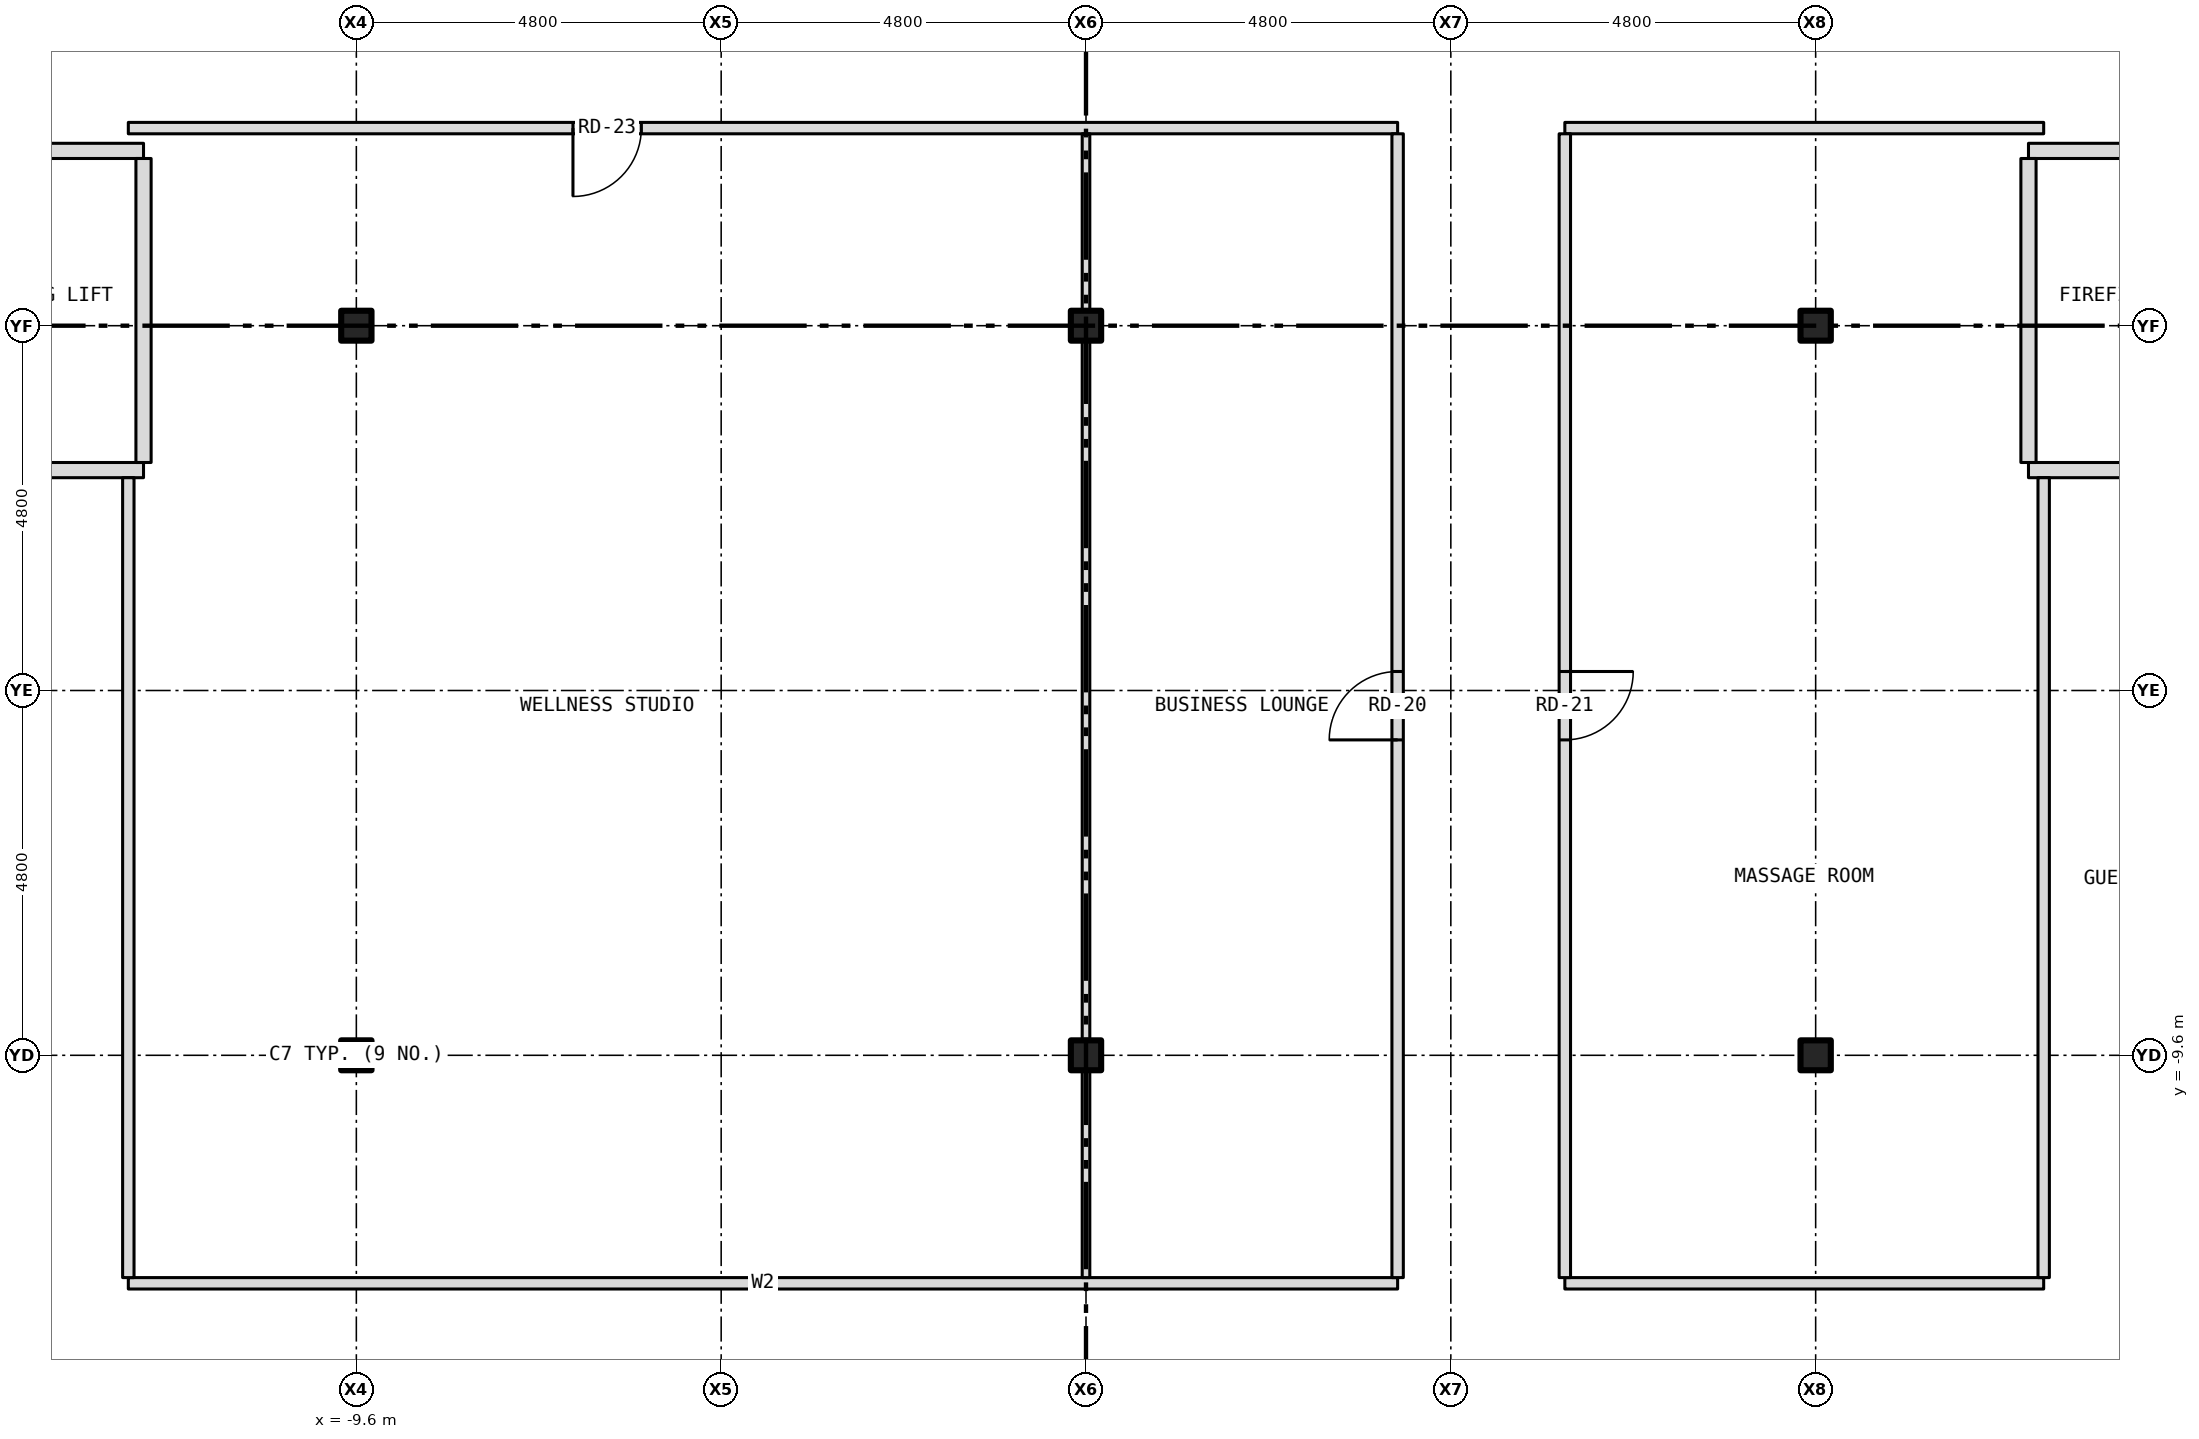
"""IFC4 building model, lengths in metres.
Left out: names, types, materials, properties, quantities, classifications, styles, units other than length and angle.
Written with IfcOpenShell. Run it as: python <this file> out.ifc"""

import sys

from ifc_helpers import new_model, si_unit, direction, frame, frame_2d, origin, origin_2d, place, context, subcontext, project, spatial, rectangle, i_section, extrude, element, fill, save


model = new_model("IFC4")
c1 = context("Model", 3, precision=1e-05, world=origin(), true_north=direction((0.0, 1.0)))
c2 = subcontext(c1, "Body", "Model", "MODEL_VIEW")
j1 = project(units=[si_unit("LENGTHUNIT", "METRE"), si_unit("PLANEANGLEUNIT", "RADIAN")], contexts=[c1])
p1 = place(None, origin())
s1 = spatial("IfcSite", under=j1, at=p1, CompositionType="ELEMENT")
p2 = place(p1, origin())
s2 = spatial("IfcBuilding", under=s1, at=p2, CompositionType="ELEMENT")
p3 = place(p2, frame((0.0, 0.0, 113.5)))
s3 = spatial("IfcBuildingStorey", under=s2, at=p3, CompositionType="ELEMENT", Elevation=113.5)
for number, where, z_axis, x_axis in (
    (1, (-9.6, -9.6, -0.15), (0.0, 0.0, 1.0), (1.0, 0.0, 0.0)),
    (2, (-9.6, 0.0, -0.15), (0.0, 0.0, 1.0), (1.0, 0.0, 0.0)),
    (3, (0.0, -9.6, -0.15), (0.0, 0.0, 1.0), (1.0, 0.0, 0.0)),
    (4, (0.0, 0.0, -0.15), (0.0, 0.0, 1.0), (1.0, 0.0, 0.0)),
    (5, (9.6, -9.6, -0.15), (0.0, 0.0, 1.0), (1.0, 0.0, 0.0)),
    (6, (9.6, 0.0, -0.15), (0.0, 0.0, 1.0), (1.0, 0.0, 0.0)),
):
    element("IfcColumn", number, at=place(p3, frame(where, z_axis=z_axis, x_axis=x_axis)), inside=s3, PredefinedType="COLUMN", context=c2, shape_type="SweptSolid", body=[
        extrude(i_section(OverallWidth=0.399, OverallDepth=0.394, WebThickness=0.023, FlangeThickness=0.037, at=origin_2d()), origin(), (0.0, 0.0, 1.0), 3.5),
    ])
p4 = place(p3, frame((-12.6, -12.6, 0.0), z_axis=(0.0, 0.0, 1.0), x_axis=(1.0, 0.0, 0.0)))
e7 = element("IfcWall", 7, at=p4, inside=s3, PredefinedType="PARTITIONING", context=c2, shape_type="SweptSolid", body=[
    extrude(rectangle(XDim=16.7, YDim=0.15, at=frame_2d((8.35, 0.0))), origin(), (0.0, 0.0, 1.0), 3.35),
])
p5 = place(p3, frame((6.3, -12.6, 0.0), z_axis=(0.0, 0.0, 1.0), x_axis=(1.0, 0.0, 0.0)))
e8 = element("IfcWall", 8, at=p5, inside=s3, PredefinedType="PARTITIONING", context=c2, shape_type="SweptSolid", body=[
    extrude(rectangle(XDim=6.3, YDim=0.15, at=frame_2d((3.15, 0.0))), origin(), (0.0, 0.0, 1.0), 3.35),
])
p6 = place(p3, frame((-15.68, -1.9, 0.0), z_axis=(0.0, 0.0, 1.0), x_axis=(1.0, 0.0, 0.0)))
e9 = element("IfcWall", 9, at=p6, inside=s3, PredefinedType="PARTITIONING", context=c2, shape_type="SweptSolid", body=[
    extrude(rectangle(XDim=3.28, YDim=0.2, at=frame_2d((1.64, 0.0))), origin(), (0.0, 0.0, 1.0), 3.35),
])
p7 = place(p6, frame((0.94, 0.0, 0.0)))
e10 = element("IfcOpeningElement", 10, at=p7, cuts=e9, PredefinedType="OPENING", context=c2, shape_type="SweptSolid", body=[
    extrude(rectangle(XDim=1.1, YDim=2.1, at=frame_2d((0.55, 1.05))), frame((0.0, 0.112, 0.0), z_axis=(0.0, -1.0, 0.0), x_axis=(1.0, 0.0, 0.0)), (0.0, 0.0, 1.0), 0.224),
])
p8 = place(p3, frame((12.4, -1.9, 0.0), z_axis=(0.0, 0.0, 1.0), x_axis=(1.0, 0.0, 0.0)))
e11 = element("IfcWall", 11, at=p8, inside=s3, PredefinedType="PARTITIONING", context=c2, shape_type="SweptSolid", body=[
    extrude(rectangle(XDim=3.28, YDim=0.2, at=frame_2d((1.64, 0.0))), origin(), (0.0, 0.0, 1.0), 3.35),
])
p9 = place(p8, frame((1.24, 0.0, 0.0)))
e12 = element("IfcOpeningElement", 12, at=p9, cuts=e11, PredefinedType="OPENING", context=c2, shape_type="SweptSolid", body=[
    extrude(rectangle(XDim=1.1, YDim=2.1, at=frame_2d((0.55, 1.05))), frame((0.0, 0.112, 0.0), z_axis=(0.0, -1.0, 0.0), x_axis=(1.0, 0.0, 0.0)), (0.0, 0.0, 1.0), 0.224),
])
p10 = place(p3, frame((-15.68, 2.3, 0.0), z_axis=(0.0, 0.0, 1.0), x_axis=(1.0, 0.0, 0.0)))
e13 = element("IfcWall", 13, at=p10, inside=s3, PredefinedType="PARTITIONING", context=c2, shape_type="SweptSolid", body=[
    extrude(rectangle(XDim=3.28, YDim=0.2, at=frame_2d((1.64, 0.0))), origin(), (0.0, 0.0, 1.0), 3.35),
])
p11 = place(p10, frame((0.84, 0.0, 0.0)))
e14 = element("IfcOpeningElement", 14, at=p11, cuts=e13, PredefinedType="OPENING", context=c2, shape_type="SweptSolid", body=[
    extrude(rectangle(XDim=1.1, YDim=2.1, at=frame_2d((0.55, 1.05))), frame((0.0, 0.112, 0.0), z_axis=(0.0, -1.0, 0.0), x_axis=(1.0, 0.0, 0.0)), (0.0, 0.0, 1.0), 0.224),
])
p12 = place(p3, frame((12.4, 2.3, 0.0), z_axis=(0.0, 0.0, 1.0), x_axis=(1.0, 0.0, 0.0)))
e15 = element("IfcWall", 15, at=p12, inside=s3, PredefinedType="PARTITIONING", context=c2, shape_type="SweptSolid", body=[
    extrude(rectangle(XDim=3.28, YDim=0.2, at=frame_2d((1.64, 0.0))), origin(), (0.0, 0.0, 1.0), 3.35),
])
p13 = place(p12, frame((1.34, 0.0, 0.0)))
e16 = element("IfcOpeningElement", 16, at=p13, cuts=e15, PredefinedType="OPENING", context=c2, shape_type="SweptSolid", body=[
    extrude(rectangle(XDim=1.1, YDim=2.1, at=frame_2d((0.55, 1.05))), frame((0.0, 0.112, 0.0), z_axis=(0.0, -1.0, 0.0), x_axis=(1.0, 0.0, 0.0)), (0.0, 0.0, 1.0), 0.224),
])
p14 = place(p3, frame((-12.6, 2.6, 0.0), z_axis=(0.0, 0.0, 1.0), x_axis=(1.0, 0.0, 0.0)))
e17 = element("IfcWall", 17, at=p14, inside=s3, PredefinedType="PARTITIONING", context=c2, shape_type="SweptSolid", body=[
    extrude(rectangle(XDim=16.7, YDim=0.15, at=frame_2d((8.35, 0.0))), origin(), (0.0, 0.0, 1.0), 3.35),
])
p15 = place(p14, frame((5.85, 0.0, 0.0)))
e18 = element("IfcOpeningElement", 18, at=p15, cuts=e17, PredefinedType="OPENING", context=c2, shape_type="SweptSolid", body=[
    extrude(rectangle(XDim=0.9, YDim=2.1, at=frame_2d((0.45, 1.05))), frame((0.0, 0.087, 0.0), z_axis=(0.0, -1.0, 0.0), x_axis=(1.0, 0.0, 0.0)), (0.0, 0.0, 1.0), 0.174),
])
p16 = place(p3, frame((6.3, 2.6, 0.0), z_axis=(0.0, 0.0, 1.0), x_axis=(1.0, 0.0, 0.0)))
e19 = element("IfcWall", 19, at=p16, inside=s3, PredefinedType="PARTITIONING", context=c2, shape_type="SweptSolid", body=[
    extrude(rectangle(XDim=6.3, YDim=0.15, at=frame_2d((3.15, 0.0))), origin(), (0.0, 0.0, 1.0), 3.35),
])
p17 = place(p3, frame((-12.6, -12.525, 0.0), z_axis=(0.0, 0.0, 1.0), x_axis=(0.0, 1.0, 0.0)))
e20 = element("IfcWall", 20, at=p17, inside=s3, PredefinedType="PARTITIONING", context=c2, shape_type="SweptSolid", body=[
    extrude(rectangle(XDim=10.525, YDim=0.15, at=frame_2d((5.262, 0.0))), origin(), (0.0, 0.0, 1.0), 3.35),
])
p18 = place(p3, frame((-12.4, -1.8, 0.0), z_axis=(0.0, 0.0, 1.0), x_axis=(0.0, 1.0, 0.0)))
e21 = element("IfcWall", 21, at=p18, inside=s3, PredefinedType="PARTITIONING", context=c2, shape_type="SweptSolid", body=[
    extrude(rectangle(XDim=4.0, YDim=0.2, at=frame_2d((2.0, 0.0))), origin(), (0.0, 0.0, 1.0), 3.35),
])
p19 = place(p3, frame((0.0, -12.525, 0.0), z_axis=(0.0, 0.0, 1.0), x_axis=(0.0, 1.0, 0.0)))
e22 = element("IfcWall", 22, at=p19, inside=s3, PredefinedType="PARTITIONING", context=c2, shape_type="SweptSolid", body=[
    extrude(rectangle(XDim=2.726, YDim=0.1, at=frame_2d((1.363, 0.0))), origin(), (0.0, 0.0, 1.0), 2.728),
])
p20 = place(p3, frame((0.0, -9.799, 0.0), z_axis=(0.0, 0.0, 1.0), x_axis=(0.0, 1.0, 0.0)))
e23 = element("IfcWall", 23, at=p20, inside=s3, PredefinedType="PARTITIONING", context=c2, shape_type="SweptSolid", body=[
    extrude(rectangle(XDim=0.398, YDim=0.1, at=frame_2d((0.199, 0.0))), origin(), (0.0, 0.0, 1.0), 3.35),
])
p21 = place(p3, frame((0.0, -9.401, 0.0), z_axis=(0.0, 0.0, 1.0), x_axis=(0.0, 1.0, 0.0)))
e24 = element("IfcWall", 24, at=p21, inside=s3, PredefinedType="PARTITIONING", context=c2, shape_type="SweptSolid", body=[
    extrude(rectangle(XDim=9.202, YDim=0.1, at=frame_2d((4.601, 0.0))), origin(), (0.0, 0.0, 1.0), 2.728),
])
p22 = place(p3, frame((0.0, -0.199, 0.0), z_axis=(0.0, 0.0, 1.0), x_axis=(0.0, 1.0, 0.0)))
e25 = element("IfcWall", 25, at=p22, inside=s3, PredefinedType="PARTITIONING", context=c2, shape_type="SweptSolid", body=[
    extrude(rectangle(XDim=0.398, YDim=0.1, at=frame_2d((0.199, 0.0))), origin(), (0.0, 0.0, 1.0), 3.35),
])
p23 = place(p3, frame((0.0, 0.199, 0.0), z_axis=(0.0, 0.0, 1.0), x_axis=(0.0, 1.0, 0.0)))
e26 = element("IfcWall", 26, at=p23, inside=s3, PredefinedType="PARTITIONING", context=c2, shape_type="SweptSolid", body=[
    extrude(rectangle(XDim=2.326, YDim=0.1, at=frame_2d((1.163, 0.0))), origin(), (0.0, 0.0, 1.0), 2.728),
])
p24 = place(p3, frame((4.1, -12.525, 0.0), z_axis=(0.0, 0.0, 1.0), x_axis=(0.0, 1.0, 0.0)))
e27 = element("IfcWall", 27, at=p24, inside=s3, PredefinedType="PARTITIONING", context=c2, shape_type="SweptSolid", body=[
    extrude(rectangle(XDim=15.05, YDim=0.15, at=frame_2d((7.525, 0.0))), origin(), (0.0, 0.0, 1.0), 3.35),
])
p25 = place(p24, frame((7.075, 0.0, 0.0)))
e28 = element("IfcOpeningElement", 28, at=p25, cuts=e27, PredefinedType="OPENING", context=c2, shape_type="SweptSolid", body=[
    extrude(rectangle(XDim=0.9, YDim=2.1, at=frame_2d((0.45, 1.05))), frame((0.0, 0.087, 0.0), z_axis=(0.0, -1.0, 0.0), x_axis=(1.0, 0.0, 0.0)), (0.0, 0.0, 1.0), 0.174),
])
p26 = place(p3, frame((6.3, -12.525, 0.0), z_axis=(0.0, 0.0, 1.0), x_axis=(0.0, 1.0, 0.0)))
e29 = element("IfcWall", 29, at=p26, inside=s3, PredefinedType="PARTITIONING", context=c2, shape_type="SweptSolid", body=[
    extrude(rectangle(XDim=15.05, YDim=0.15, at=frame_2d((7.525, 0.0))), origin(), (0.0, 0.0, 1.0), 3.35),
])
p27 = place(p26, frame((7.075, 0.0, 0.0)))
e30 = element("IfcOpeningElement", 30, at=p27, cuts=e29, PredefinedType="OPENING", context=c2, shape_type="SweptSolid", body=[
    extrude(rectangle(XDim=0.9, YDim=2.1, at=frame_2d((0.45, 1.05))), frame((0.0, 0.087, 0.0), z_axis=(0.0, -1.0, 0.0), x_axis=(1.0, 0.0, 0.0)), (0.0, 0.0, 1.0), 0.174),
])
p28 = place(p3, frame((12.4, -1.8, 0.0), z_axis=(0.0, 0.0, 1.0), x_axis=(0.0, 1.0, 0.0)))
e31 = element("IfcWall", 31, at=p28, inside=s3, PredefinedType="PARTITIONING", context=c2, shape_type="SweptSolid", body=[
    extrude(rectangle(XDim=4.0, YDim=0.2, at=frame_2d((2.0, 0.0))), origin(), (0.0, 0.0, 1.0), 3.35),
])
p29 = place(p3, frame((12.6, -12.525, 0.0), z_axis=(0.0, 0.0, 1.0), x_axis=(0.0, 1.0, 0.0)))
e32 = element("IfcWall", 32, at=p29, inside=s3, PredefinedType="PARTITIONING", context=c2, shape_type="SweptSolid", body=[
    extrude(rectangle(XDim=10.525, YDim=0.15, at=frame_2d((5.262, 0.0))), origin(), (0.0, 0.0, 1.0), 3.35),
])
p30 = place(p25, origin())
e33 = element("IfcDoor", 33, at=p30, inside=s3, OperationType="SINGLE_SWING_LEFT", PredefinedType="DOOR", context=c2, shape_type="SweptSolid", body=[
    extrude(rectangle(XDim=0.9, YDim=2.1, at=frame_2d((0.45, 1.05))), frame((0.0, 0.025, 0.0), z_axis=(0.0, -1.0, 0.0), x_axis=(1.0, 0.0, 0.0)), (0.0, 0.0, 1.0), 0.05),
])
fill(e28, e33)
p31 = place(p27, origin())
e34 = element("IfcDoor", 34, at=p31, inside=s3, OperationType="SINGLE_SWING_RIGHT", PredefinedType="DOOR", context=c2, shape_type="SweptSolid", body=[
    extrude(rectangle(XDim=0.9, YDim=2.1, at=frame_2d((0.45, 1.05))), frame((0.0, 0.025, 0.0), z_axis=(0.0, -1.0, 0.0), x_axis=(1.0, 0.0, 0.0)), (0.0, 0.0, 1.0), 0.05),
])
fill(e30, e34)
p32 = place(p15, origin())
e35 = element("IfcDoor", 35, at=p32, inside=s3, OperationType="SINGLE_SWING_LEFT", PredefinedType="DOOR", context=c2, shape_type="SweptSolid", body=[
    extrude(rectangle(XDim=0.9, YDim=2.1, at=frame_2d((0.45, 1.05))), frame((0.0, 0.025, 0.0), z_axis=(0.0, -1.0, 0.0), x_axis=(1.0, 0.0, 0.0)), (0.0, 0.0, 1.0), 0.05),
])
fill(e18, e35)
save(model, sys.argv[1])
